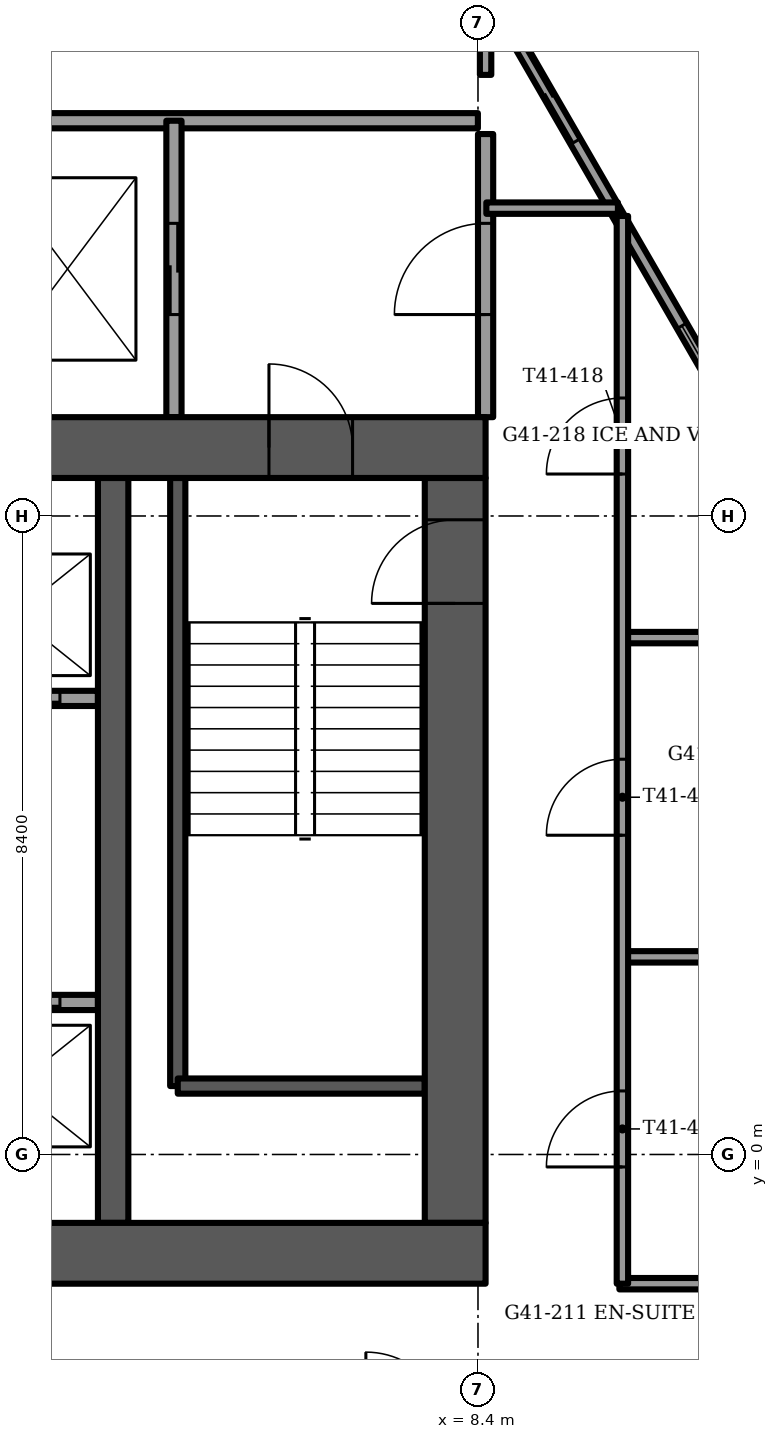
"""IFC4 building model, lengths in metres.
Left out: names, types, materials, properties, quantities, classifications, styles, units other than length and angle.
Written with IfcOpenShell. Run it as: python <this file> out.ifc"""

import sys

from ifc_helpers import new_model, si_unit, direction, frame, frame_2d, origin, place, context, subcontext, project, spatial, rectangle, extrude, element, fill, save


model = new_model("IFC4")
c1 = context("Model", 3, precision=1e-05, world=origin(), true_north=direction((0.0, 1.0)))
c2 = subcontext(c1, "Body", "Model", "MODEL_VIEW")
j1 = project(units=[si_unit("LENGTHUNIT", "METRE"), si_unit("PLANEANGLEUNIT", "RADIAN")], contexts=[c1])
p1 = place(None, origin())
s1 = spatial("IfcSite", under=j1, at=p1, CompositionType="ELEMENT")
p2 = place(p1, origin())
s2 = spatial("IfcBuilding", under=s1, at=p2, CompositionType="ELEMENT")
p3 = place(p2, frame((0.0, 0.0, 168.25)))
s3 = spatial("IfcBuildingStorey", under=s2, at=p3, CompositionType="ELEMENT", Elevation=168.25)
p4 = place(p3, frame((-8.5, -1.3, -0.3), z_axis=(0.0, 0.0, 1.0), x_axis=(1.0, 0.0, 0.0)))
e1 = element("IfcWall", 1, at=p4, inside=s3, PredefinedType="SHEAR", context=c2, shape_type="SweptSolid", body=[
    extrude(rectangle(XDim=17.0, YDim=0.8, at=frame_2d((8.5, 0.0))), origin(), (0.0, 0.0, 1.0), 3.75),
])
p5 = place(p4, frame((7.7, 0.0, 0.0)))
e2 = element("IfcOpeningElement", 2, at=p5, cuts=e1, PredefinedType="OPENING", context=c2, shape_type="SweptSolid", body=[
    extrude(rectangle(XDim=1.6, YDim=2.1, at=frame_2d((0.8, 1.05))), frame((0.0, 0.4, 0.0), z_axis=(0.0, -1.0, 0.0), x_axis=(1.0, 0.0, 0.0)), (0.0, 0.0, 1.0), 0.8),
])
p6 = place(p3, frame((-8.5, 9.3, -0.3), z_axis=(0.0, 0.0, 1.0), x_axis=(1.0, 0.0, 0.0)))
e3 = element("IfcWall", 3, at=p6, inside=s3, PredefinedType="SHEAR", context=c2, shape_type="SweptSolid", body=[
    extrude(rectangle(XDim=17.0, YDim=0.8, at=frame_2d((8.5, 0.0))), origin(), (0.0, 0.0, 1.0), 3.75),
])
p7 = place(p6, frame((7.7, 0.0, 0.0)))
e4 = element("IfcOpeningElement", 4, at=p7, cuts=e3, PredefinedType="OPENING", context=c2, shape_type="SweptSolid", body=[
    extrude(rectangle(XDim=1.6, YDim=2.1, at=frame_2d((0.8, 1.05))), frame((0.0, 0.4, 0.0), z_axis=(0.0, -1.0, 0.0), x_axis=(1.0, 0.0, 0.0)), (0.0, 0.0, 1.0), 0.8),
])
p8 = place(p6, frame((1.75, 0.0, 0.0)))
e5 = element("IfcOpeningElement", 5, at=p8, cuts=e3, PredefinedType="OPENING", context=c2, shape_type="SweptSolid", body=[
    extrude(rectangle(XDim=1.1, YDim=2.1, at=frame_2d((0.55, 1.05))), frame((0.0, 0.4, 0.0), z_axis=(0.0, -1.0, 0.0), x_axis=(1.0, 0.0, 0.0)), (0.0, 0.0, 1.0), 0.8),
])
p9 = place(p6, frame((14.15, 0.0, 0.0)))
e6 = element("IfcOpeningElement", 6, at=p9, cuts=e3, PredefinedType="OPENING", context=c2, shape_type="SweptSolid", body=[
    extrude(rectangle(XDim=1.1, YDim=2.1, at=frame_2d((0.55, 1.05))), frame((0.0, 0.4, 0.0), z_axis=(0.0, -1.0, 0.0), x_axis=(1.0, 0.0, 0.0)), (0.0, 0.0, 1.0), 0.8),
])
p10 = place(p3, frame((8.1, -0.9, -0.3), z_axis=(0.0, 0.0, 1.0), x_axis=(0.0, 1.0, 0.0)))
e7 = element("IfcWall", 7, at=p10, inside=s3, PredefinedType="SHEAR", context=c2, shape_type="SweptSolid", body=[
    extrude(rectangle(XDim=9.8, YDim=0.8, at=frame_2d((4.9, 0.0))), origin(), (0.0, 0.0, 1.0), 3.75),
])
p11 = place(p10, frame((8.15, 0.0, 0.0)))
e8 = element("IfcOpeningElement", 8, at=p11, cuts=e7, PredefinedType="OPENING", context=c2, shape_type="SweptSolid", body=[
    extrude(rectangle(XDim=1.1, YDim=2.1, at=frame_2d((0.55, 1.05))), frame((0.0, 0.4, 0.0), z_axis=(0.0, -1.0, 0.0), x_axis=(1.0, 0.0, 0.0)), (0.0, 0.0, 1.0), 0.8),
])
p12 = place(p3, frame((3.6, -0.9, -0.3), z_axis=(0.0, 0.0, 1.0), x_axis=(0.0, 1.0, 0.0)))
e9 = element("IfcWall", 9, at=p12, inside=s3, PredefinedType="SHEAR", context=c2, shape_type="SweptSolid", body=[
    extrude(rectangle(XDim=9.8, YDim=0.4, at=frame_2d((4.9, 0.0))), origin(), (0.0, 0.0, 1.0), 3.75),
])
p13 = place(p3, frame((13.521, 12.527, 0.0), z_axis=(0.0, 0.0, 1.0), x_axis=(-0.49998343065, 0.866034969892, 0.0)))
e10 = element("IfcWall", 10, at=p13, inside=s3, PredefinedType="PARAPET", context=c2, shape_type="SweptSolid", body=[
    extrude(rectangle(XDim=6.181, YDim=0.9, at=frame_2d((3.091, 0.0))), origin(), (0.0, 0.0, 1.0), 1.1),
])
p14 = place(p3, frame((9.43, -14.516, 0.0), z_axis=(0.0, 0.0, 1.0), x_axis=(0.500004460396, 0.866022828558, 0.0)))
e11 = element("IfcWall", 11, at=p14, inside=s3, PredefinedType="SOLIDWALL", context=c2, shape_type="SweptSolid", body=[
    extrude(rectangle(XDim=15.712, YDim=0.15, at=frame_2d((7.856, 0.0))), origin(), (0.0, 0.0, 1.0), 3.45),
])
p15 = place(p14, frame((1.856, 0.0, 0.15)))
e12 = element("IfcOpeningElement", 12, at=p15, cuts=e11, PredefinedType="OPENING", context=c2, shape_type="SweptSolid", body=[
    extrude(rectangle(XDim=1.6, YDim=2.85, at=frame_2d((0.8, 1.425))), frame((0.0, 0.075, 0.0), z_axis=(0.0, -1.0, 0.0), x_axis=(1.0, 0.0, 0.0)), (0.0, 0.0, 1.0), 0.15),
])
p16 = place(p14, frame((4.056, 0.0, 0.0)))
e13 = element("IfcOpeningElement", 13, at=p16, cuts=e11, PredefinedType="OPENING", context=c2, shape_type="SweptSolid", body=[
    extrude(rectangle(XDim=1.4, YDim=2.4, at=frame_2d((0.7, 1.2))), frame((0.0, 0.075, 0.0), z_axis=(0.0, -1.0, 0.0), x_axis=(1.0, 0.0, 0.0)), (0.0, 0.0, 1.0), 0.15),
])
p17 = place(p14, frame((6.056, 0.0, 0.15)))
e14 = element("IfcOpeningElement", 14, at=p17, cuts=e11, PredefinedType="OPENING", context=c2, shape_type="SweptSolid", body=[
    extrude(rectangle(XDim=1.6, YDim=2.85, at=frame_2d((0.8, 1.425))), frame((0.0, 0.075, 0.0), z_axis=(0.0, -1.0, 0.0), x_axis=(1.0, 0.0, 0.0)), (0.0, 0.0, 1.0), 0.15),
])
p18 = place(p14, frame((8.256, 0.0, 0.0)))
e15 = element("IfcOpeningElement", 15, at=p18, cuts=e11, PredefinedType="OPENING", context=c2, shape_type="SweptSolid", body=[
    extrude(rectangle(XDim=1.4, YDim=2.4, at=frame_2d((0.7, 1.2))), frame((0.0, 0.075, 0.0), z_axis=(0.0, -1.0, 0.0), x_axis=(1.0, 0.0, 0.0)), (0.0, 0.0, 1.0), 0.15),
])
p19 = place(p14, frame((10.256, 0.0, 0.15)))
e16 = element("IfcOpeningElement", 16, at=p19, cuts=e11, PredefinedType="OPENING", context=c2, shape_type="SweptSolid", body=[
    extrude(rectangle(XDim=1.6, YDim=2.85, at=frame_2d((0.8, 1.425))), frame((0.0, 0.075, 0.0), z_axis=(0.0, -1.0, 0.0), x_axis=(1.0, 0.0, 0.0)), (0.0, 0.0, 1.0), 0.15),
])
p20 = place(p3, frame((17.287, 0.156, 0.0), z_axis=(0.0, 0.0, 1.0), x_axis=(-0.500001917853, 0.866024296509, 0.0)))
e17 = element("IfcWall", 17, at=p20, inside=s3, PredefinedType="SOLIDWALL", context=c2, shape_type="SweptSolid", body=[
    extrude(rectangle(XDim=19.788, YDim=0.15, at=frame_2d((9.894, 0.0))), origin(), (0.0, 0.0, 1.0), 3.45),
])
p21 = place(p20, frame((1.046, 0.0, 0.15)))
e18 = element("IfcOpeningElement", 18, at=p21, cuts=e17, PredefinedType="OPENING", context=c2, shape_type="SweptSolid", body=[
    extrude(rectangle(XDim=1.4, YDim=2.85, at=frame_2d((0.7, 1.425))), frame((0.0, 0.075, 0.0), z_axis=(0.0, -1.0, 0.0), x_axis=(1.0, 0.0, 0.0)), (0.0, 0.0, 1.0), 0.15),
])
p22 = place(p20, frame((4.608, 0.0, 0.15)))
e19 = element("IfcOpeningElement", 19, at=p22, cuts=e17, PredefinedType="OPENING", context=c2, shape_type="SweptSolid", body=[
    extrude(rectangle(XDim=0.9, YDim=2.85, at=frame_2d((0.45, 1.425))), frame((0.0, 0.075, 0.0), z_axis=(0.0, -1.0, 0.0), x_axis=(1.0, 0.0, 0.0)), (0.0, 0.0, 1.0), 0.15),
])
p23 = place(p20, frame((5.896, 0.0, 0.15)))
e20 = element("IfcOpeningElement", 20, at=p23, cuts=e17, PredefinedType="OPENING", context=c2, shape_type="SweptSolid", body=[
    extrude(rectangle(XDim=1.4, YDim=2.85, at=frame_2d((0.7, 1.425))), frame((0.0, 0.075, 0.0), z_axis=(0.0, -1.0, 0.0), x_axis=(1.0, 0.0, 0.0)), (0.0, 0.0, 1.0), 0.15),
])
p24 = place(p20, frame((8.808, 0.0, 0.15)))
e21 = element("IfcOpeningElement", 21, at=p24, cuts=e17, PredefinedType="OPENING", context=c2, shape_type="SweptSolid", body=[
    extrude(rectangle(XDim=1.6, YDim=2.85, at=frame_2d((0.8, 1.425))), frame((0.0, 0.075, 0.0), z_axis=(0.0, -1.0, 0.0), x_axis=(1.0, 0.0, 0.0)), (0.0, 0.0, 1.0), 0.15),
])
p25 = place(p20, frame((11.008, 0.0, 0.15)))
e22 = element("IfcOpeningElement", 22, at=p25, cuts=e17, PredefinedType="OPENING", context=c2, shape_type="SweptSolid", body=[
    extrude(rectangle(XDim=1.4, YDim=2.85, at=frame_2d((0.7, 1.425))), frame((0.0, 0.075, 0.0), z_axis=(0.0, -1.0, 0.0), x_axis=(1.0, 0.0, 0.0)), (0.0, 0.0, 1.0), 0.15),
])
p26 = place(p20, frame((15.208, 0.0, 0.0)))
e23 = element("IfcOpeningElement", 23, at=p26, cuts=e17, PredefinedType="OPENING", context=c2, shape_type="SweptSolid", body=[
    extrude(rectangle(XDim=1.4, YDim=2.4, at=frame_2d((0.7, 1.2))), frame((0.0, 0.075, 0.0), z_axis=(0.0, -1.0, 0.0), x_axis=(1.0, 0.0, 0.0)), (0.0, 0.0, 1.0), 0.15),
])
p27 = place(p20, frame((18.019, 0.0, 0.15)))
e24 = element("IfcOpeningElement", 24, at=p27, cuts=e17, PredefinedType="OPENING", context=c2, shape_type="SweptSolid", body=[
    extrude(rectangle(XDim=1.6, YDim=2.73, at=frame_2d((0.8, 1.365))), frame((0.0, 0.075, 0.0), z_axis=(0.0, -1.0, 0.0), x_axis=(1.0, 0.0, 0.0)), (0.0, 0.0, 1.0), 0.15),
])
p28 = place(p3, frame((1.1, 2.0, 0.0), z_axis=(0.0, 0.0, 1.0), x_axis=(1.0, 0.0, 0.0)))
e25 = element("IfcWall", 25, at=p28, inside=s3, PredefinedType="PARTITIONING", context=c2, shape_type="SweptSolid", body=[
    extrude(rectangle(XDim=2.3, YDim=0.2, at=frame_2d((1.15, 0.0))), origin(), (0.0, 0.0, 1.0), 3.45),
])
p29 = place(p28, frame((0.6, 0.0, 0.0)))
e26 = element("IfcOpeningElement", 26, at=p29, cuts=e25, PredefinedType="OPENING", context=c2, shape_type="SweptSolid", body=[
    extrude(rectangle(XDim=1.2, YDim=2.1, at=frame_2d((0.6, 1.05))), frame((0.0, 0.1, 0.0), z_axis=(0.0, -1.0, 0.0), x_axis=(1.0, 0.0, 0.0)), (0.0, 0.0, 1.0), 0.2),
])
p30 = place(p3, frame((1.1, 6.0, 0.0), z_axis=(0.0, 0.0, 1.0), x_axis=(1.0, 0.0, 0.0)))
e27 = element("IfcWall", 27, at=p30, inside=s3, PredefinedType="PARTITIONING", context=c2, shape_type="SweptSolid", body=[
    extrude(rectangle(XDim=2.3, YDim=0.2, at=frame_2d((1.15, 0.0))), origin(), (0.0, 0.0, 1.0), 3.45),
])
p31 = place(p30, frame((0.6, 0.0, 0.0)))
e28 = element("IfcOpeningElement", 28, at=p31, cuts=e27, PredefinedType="OPENING", context=c2, shape_type="SweptSolid", body=[
    extrude(rectangle(XDim=1.2, YDim=2.1, at=frame_2d((0.6, 1.05))), frame((0.0, 0.1, 0.0), z_axis=(0.0, -1.0, 0.0), x_axis=(1.0, 0.0, 0.0)), (0.0, 0.0, 1.0), 0.2),
])
p32 = place(p3, frame((4.45, 0.9, -0.3), z_axis=(0.0, 0.0, 1.0), x_axis=(0.0, 1.0, 0.0)))
e29 = element("IfcWall", 29, at=p32, inside=s3, PredefinedType="SOLIDWALL", context=c2, shape_type="SweptSolid", body=[
    extrude(rectangle(XDim=8.0, YDim=0.2, at=frame_2d((4.0, 0.0))), origin(), (0.0, 0.0, 1.0), 3.75),
])
p33 = place(p3, frame((4.45, 0.9, -0.3), z_axis=(0.0, 0.0, 1.0), x_axis=(1.0, 0.0, 0.0)))
e30 = element("IfcWall", 30, at=p33, inside=s3, PredefinedType="SOLIDWALL", context=c2, shape_type="SweptSolid", body=[
    extrude(rectangle(XDim=3.25, YDim=0.2, at=frame_2d((1.625, 0.0))), origin(), (0.0, 0.0, 1.0), 3.75),
])
p34 = place(p3, frame((-8.5, 13.6, 0.0), z_axis=(0.0, 0.0, 1.0), x_axis=(1.0, 0.0, 0.0)))
e31 = element("IfcWall", 31, at=p34, inside=s3, PredefinedType="PARTITIONING", context=c2, shape_type="SweptSolid", body=[
    extrude(rectangle(XDim=16.899, YDim=0.2, at=frame_2d((8.449, 0.0))), origin(), (0.0, 0.0, 1.0), 3.45),
])
p35 = place(p34, frame((8.0, 0.0, 0.0)))
e32 = element("IfcOpeningElement", 32, at=p35, cuts=e31, PredefinedType="OPENING", context=c2, shape_type="SweptSolid", body=[
    extrude(rectangle(XDim=1.0, YDim=2.1, at=frame_2d((0.5, 1.05))), frame((0.0, 0.1, 0.0), z_axis=(0.0, -1.0, 0.0), x_axis=(1.0, 0.0, 0.0)), (0.0, 0.0, 1.0), 0.2),
])
p36 = place(p3, frame((8.5, 9.7, 0.0), z_axis=(0.0, 0.0, 1.0), x_axis=(0.0, 1.0, 0.0)))
e33 = element("IfcWall", 33, at=p36, inside=s3, PredefinedType="PARTITIONING", context=c2, shape_type="SweptSolid", body=[
    extrude(rectangle(XDim=3.725, YDim=0.2, at=frame_2d((1.862, 0.0))), origin(), (0.0, 0.0, 1.0), 3.45),
])
p37 = place(p36, frame((1.35, 0.0, 0.0)))
e34 = element("IfcOpeningElement", 34, at=p37, cuts=e33, PredefinedType="OPENING", context=c2, shape_type="SweptSolid", body=[
    extrude(rectangle(XDim=1.2, YDim=2.1, at=frame_2d((0.6, 1.05))), frame((0.0, 0.1, 0.0), z_axis=(0.0, -1.0, 0.0), x_axis=(1.0, 0.0, 0.0)), (0.0, 0.0, 1.0), 0.2),
])
p38 = place(p3, frame((4.4, 9.7, 0.0), z_axis=(0.0, 0.0, 1.0), x_axis=(0.0, 1.0, 0.0)))
e35 = element("IfcWall", 35, at=p38, inside=s3, PredefinedType="PARTITIONING", context=c2, shape_type="SweptSolid", body=[
    extrude(rectangle(XDim=3.9, YDim=0.2, at=frame_2d((1.95, 0.0))), origin(), (0.0, 0.0, 1.0), 3.45),
])
p39 = place(p38, frame((1.35, 0.0, 0.0)))
e36 = element("IfcOpeningElement", 36, at=p39, cuts=e35, PredefinedType="OPENING", context=c2, shape_type="SweptSolid", body=[
    extrude(rectangle(XDim=1.2, YDim=2.1, at=frame_2d((0.6, 1.05))), frame((0.0, 0.1, 0.0), z_axis=(0.0, -1.0, 0.0), x_axis=(1.0, 0.0, 0.0)), (0.0, 0.0, 1.0), 0.2),
])
p40 = place(p3, frame((10.26, -1.7, 0.0), z_axis=(0.0, 0.0, 1.0), x_axis=(1.0, 0.0, 0.0)))
e37 = element("IfcWall", 37, at=p40, inside=s3, PredefinedType="PARTITIONING", context=c2, shape_type="SweptSolid", body=[
    extrude(rectangle(XDim=3.54, YDim=0.15, at=frame_2d((1.77, 0.0))), origin(), (0.0, 0.0, 1.0), 3.45),
])
p41 = place(p3, frame((10.3, 2.6, 0.0), z_axis=(0.0, 0.0, 1.0), x_axis=(1.0, 0.0, 0.0)))
e38 = element("IfcWall", 38, at=p41, inside=s3, PredefinedType="PARTITIONING", context=c2, shape_type="SweptSolid", body=[
    extrude(rectangle(XDim=5.627, YDim=0.15, at=frame_2d((2.813, 0.0))), origin(), (0.0, 0.0, 1.0), 3.45),
])
p42 = place(p3, frame((10.3, 6.8, 0.0), z_axis=(0.0, 0.0, 1.0), x_axis=(1.0, 0.0, 0.0)))
e39 = element("IfcWall", 39, at=p42, inside=s3, PredefinedType="PARTITIONING", context=c2, shape_type="SweptSolid", body=[
    extrude(rectangle(XDim=3.203, YDim=0.15, at=frame_2d((1.602, 0.0))), origin(), (0.0, 0.0, 1.0), 3.45),
])
p43 = place(p3, frame((8.51, 12.45, 0.0), z_axis=(0.0, 0.0, 1.0), x_axis=(1.0, 0.0, 0.0)))
e40 = element("IfcWall", 40, at=p43, inside=s3, PredefinedType="PARTITIONING", context=c2, shape_type="SweptSolid", body=[
    extrude(rectangle(XDim=1.731, YDim=0.15, at=frame_2d((0.865, 0.0))), origin(), (0.0, 0.0, 1.0), 3.45),
])
p44 = place(p3, frame((10.3, -1.7, 0.0), z_axis=(0.0, 0.0, 1.0), x_axis=(0.0, 1.0, 0.0)))
e41 = element("IfcWall", 41, at=p44, inside=s3, PredefinedType="PARTITIONING", context=c2, shape_type="SweptSolid", body=[
    extrude(rectangle(XDim=14.047, YDim=0.15, at=frame_2d((7.023, 0.0))), origin(), (0.0, 0.0, 1.0), 3.45),
])
p45 = place(p44, frame((1.536, 0.0, 0.0)))
e42 = element("IfcOpeningElement", 42, at=p45, cuts=e41, PredefinedType="OPENING", context=c2, shape_type="SweptSolid", body=[
    extrude(rectangle(XDim=1.0, YDim=2.1, at=frame_2d((0.5, 1.05))), frame((0.0, 0.075, 0.0), z_axis=(0.0, -1.0, 0.0), x_axis=(1.0, 0.0, 0.0)), (0.0, 0.0, 1.0), 0.15),
])
p46 = place(p44, frame((5.9, 0.0, 0.0)))
e43 = element("IfcOpeningElement", 43, at=p46, cuts=e41, PredefinedType="OPENING", context=c2, shape_type="SweptSolid", body=[
    extrude(rectangle(XDim=1.0, YDim=2.1, at=frame_2d((0.5, 1.05))), frame((0.0, 0.075, 0.0), z_axis=(0.0, -1.0, 0.0), x_axis=(1.0, 0.0, 0.0)), (0.0, 0.0, 1.0), 0.15),
])
p47 = place(p44, frame((10.652, 0.0, 0.0)))
e44 = element("IfcOpeningElement", 44, at=p47, cuts=e41, PredefinedType="OPENING", context=c2, shape_type="SweptSolid", body=[
    extrude(rectangle(XDim=1.0, YDim=2.1, at=frame_2d((0.5, 1.05))), frame((0.0, 0.075, 0.0), z_axis=(0.0, -1.0, 0.0), x_axis=(1.0, 0.0, 0.0)), (0.0, 0.0, 1.0), 0.15),
])
p48 = place(p3, frame((8.5, 14.203, 0.0), z_axis=(0.0, 0.0, 1.0), x_axis=(0.0, 1.0, 0.0)))
e45 = element("IfcWall", 45, at=p48, inside=s3, PredefinedType="PARTITIONING", context=c2, shape_type="SweptSolid", body=[
    extrude(rectangle(XDim=1.262, YDim=0.15, at=frame_2d((0.631, 0.0))), origin(), (0.0, 0.0, 1.0), 3.45),
])
p49 = place(p25, origin())
e46 = element("IfcWindow", 46, at=p49, inside=s3, PartitioningType="SINGLE_PANEL", PredefinedType="WINDOW", context=c2, shape_type="SweptSolid", body=[
    extrude(rectangle(XDim=1.4, YDim=2.85, at=frame_2d((0.7, 1.425))), frame((0.0, 0.03, 0.0), z_axis=(0.0, -1.0, 0.0), x_axis=(1.0, 0.0, 0.0)), (0.0, 0.0, 1.0), 0.06),
])
fill(e22, e46)
p50 = place(p26, origin())
e47 = element("IfcDoor", 47, at=p50, inside=s3, OperationType="SLIDING_TO_RIGHT", PredefinedType="DOOR", context=c2, shape_type="SweptSolid", body=[
    extrude(rectangle(XDim=1.4, YDim=2.4, at=frame_2d((0.7, 1.2))), frame((0.0, 0.025, 0.0), z_axis=(0.0, -1.0, 0.0), x_axis=(1.0, 0.0, 0.0)), (0.0, 0.0, 1.0), 0.05),
])
fill(e23, e47)
p51 = place(p29, origin())
e48 = element("IfcDoor", 48, at=p51, inside=s3, OperationType="SLIDING_TO_LEFT", PredefinedType="DOOR", context=c2, shape_type="SweptSolid", body=[
    extrude(rectangle(XDim=1.2, YDim=2.1, at=frame_2d((0.6, 1.05))), frame((0.0, 0.025, 0.0), z_axis=(0.0, -1.0, 0.0), x_axis=(1.0, 0.0, 0.0)), (0.0, 0.0, 1.0), 0.05),
])
fill(e26, e48)
p52 = place(p31, origin())
e49 = element("IfcDoor", 49, at=p52, inside=s3, OperationType="SLIDING_TO_LEFT", PredefinedType="DOOR", context=c2, shape_type="SweptSolid", body=[
    extrude(rectangle(XDim=1.2, YDim=2.1, at=frame_2d((0.6, 1.05))), frame((0.0, 0.025, 0.0), z_axis=(0.0, -1.0, 0.0), x_axis=(1.0, 0.0, 0.0)), (0.0, 0.0, 1.0), 0.05),
])
fill(e28, e49)
p53 = place(p9, origin())
e50 = element("IfcDoor", 50, at=p53, inside=s3, OperationType="SINGLE_SWING_RIGHT", PredefinedType="DOOR", context=c2, shape_type="SweptSolid", body=[
    extrude(rectangle(XDim=1.1, YDim=2.1, at=frame_2d((0.55, 1.05))), frame((0.0, 0.025, 0.0), z_axis=(0.0, -1.0, 0.0), x_axis=(1.0, 0.0, 0.0)), (0.0, 0.0, 1.0), 0.05),
])
fill(e6, e50)
p54 = place(p11, origin())
e51 = element("IfcDoor", 51, at=p54, inside=s3, OperationType="SINGLE_SWING_LEFT", PredefinedType="DOOR", context=c2, shape_type="SweptSolid", body=[
    extrude(rectangle(XDim=1.1, YDim=2.1, at=frame_2d((0.55, 1.05))), frame((0.0, 0.025, 0.0), z_axis=(0.0, -1.0, 0.0), x_axis=(1.0, 0.0, 0.0)), (0.0, 0.0, 1.0), 0.05),
])
fill(e8, e51)
p55 = place(p39, origin())
e52 = element("IfcDoor", 52, at=p55, inside=s3, OperationType="SLIDING_TO_LEFT", PredefinedType="DOOR", context=c2, shape_type="SweptSolid", body=[
    extrude(rectangle(XDim=1.2, YDim=2.1, at=frame_2d((0.6, 1.05))), frame((0.0, 0.025, 0.0), z_axis=(0.0, -1.0, 0.0), x_axis=(1.0, 0.0, 0.0)), (0.0, 0.0, 1.0), 0.05),
])
fill(e36, e52)
p56 = place(p37, origin())
e53 = element("IfcDoor", 53, at=p56, inside=s3, OperationType="SINGLE_SWING_LEFT", PredefinedType="DOOR", context=c2, shape_type="SweptSolid", body=[
    extrude(rectangle(XDim=1.2, YDim=2.1, at=frame_2d((0.6, 1.05))), frame((0.0, 0.025, 0.0), z_axis=(0.0, -1.0, 0.0), x_axis=(1.0, 0.0, 0.0)), (0.0, 0.0, 1.0), 0.05),
])
fill(e34, e53)
p57 = place(p45, origin())
e54 = element("IfcDoor", 54, at=p57, inside=s3, OperationType="SINGLE_SWING_LEFT", PredefinedType="DOOR", context=c2, shape_type="SweptSolid", body=[
    extrude(rectangle(XDim=1.0, YDim=2.1, at=frame_2d((0.5, 1.05))), frame((0.0, 0.025, 0.0), z_axis=(0.0, -1.0, 0.0), x_axis=(1.0, 0.0, 0.0)), (0.0, 0.0, 1.0), 0.05),
])
fill(e42, e54)
p58 = place(p46, origin())
e55 = element("IfcDoor", 55, at=p58, inside=s3, OperationType="SINGLE_SWING_LEFT", PredefinedType="DOOR", context=c2, shape_type="SweptSolid", body=[
    extrude(rectangle(XDim=1.0, YDim=2.1, at=frame_2d((0.5, 1.05))), frame((0.0, 0.025, 0.0), z_axis=(0.0, -1.0, 0.0), x_axis=(1.0, 0.0, 0.0)), (0.0, 0.0, 1.0), 0.05),
])
fill(e43, e55)
p59 = place(p47, origin())
e56 = element("IfcDoor", 56, at=p59, inside=s3, OperationType="SINGLE_SWING_LEFT", PredefinedType="DOOR", context=c2, shape_type="SweptSolid", body=[
    extrude(rectangle(XDim=1.0, YDim=2.1, at=frame_2d((0.5, 1.05))), frame((0.0, 0.025, 0.0), z_axis=(0.0, -1.0, 0.0), x_axis=(1.0, 0.0, 0.0)), (0.0, 0.0, 1.0), 0.05),
])
fill(e44, e56)
save(model, sys.argv[1])
